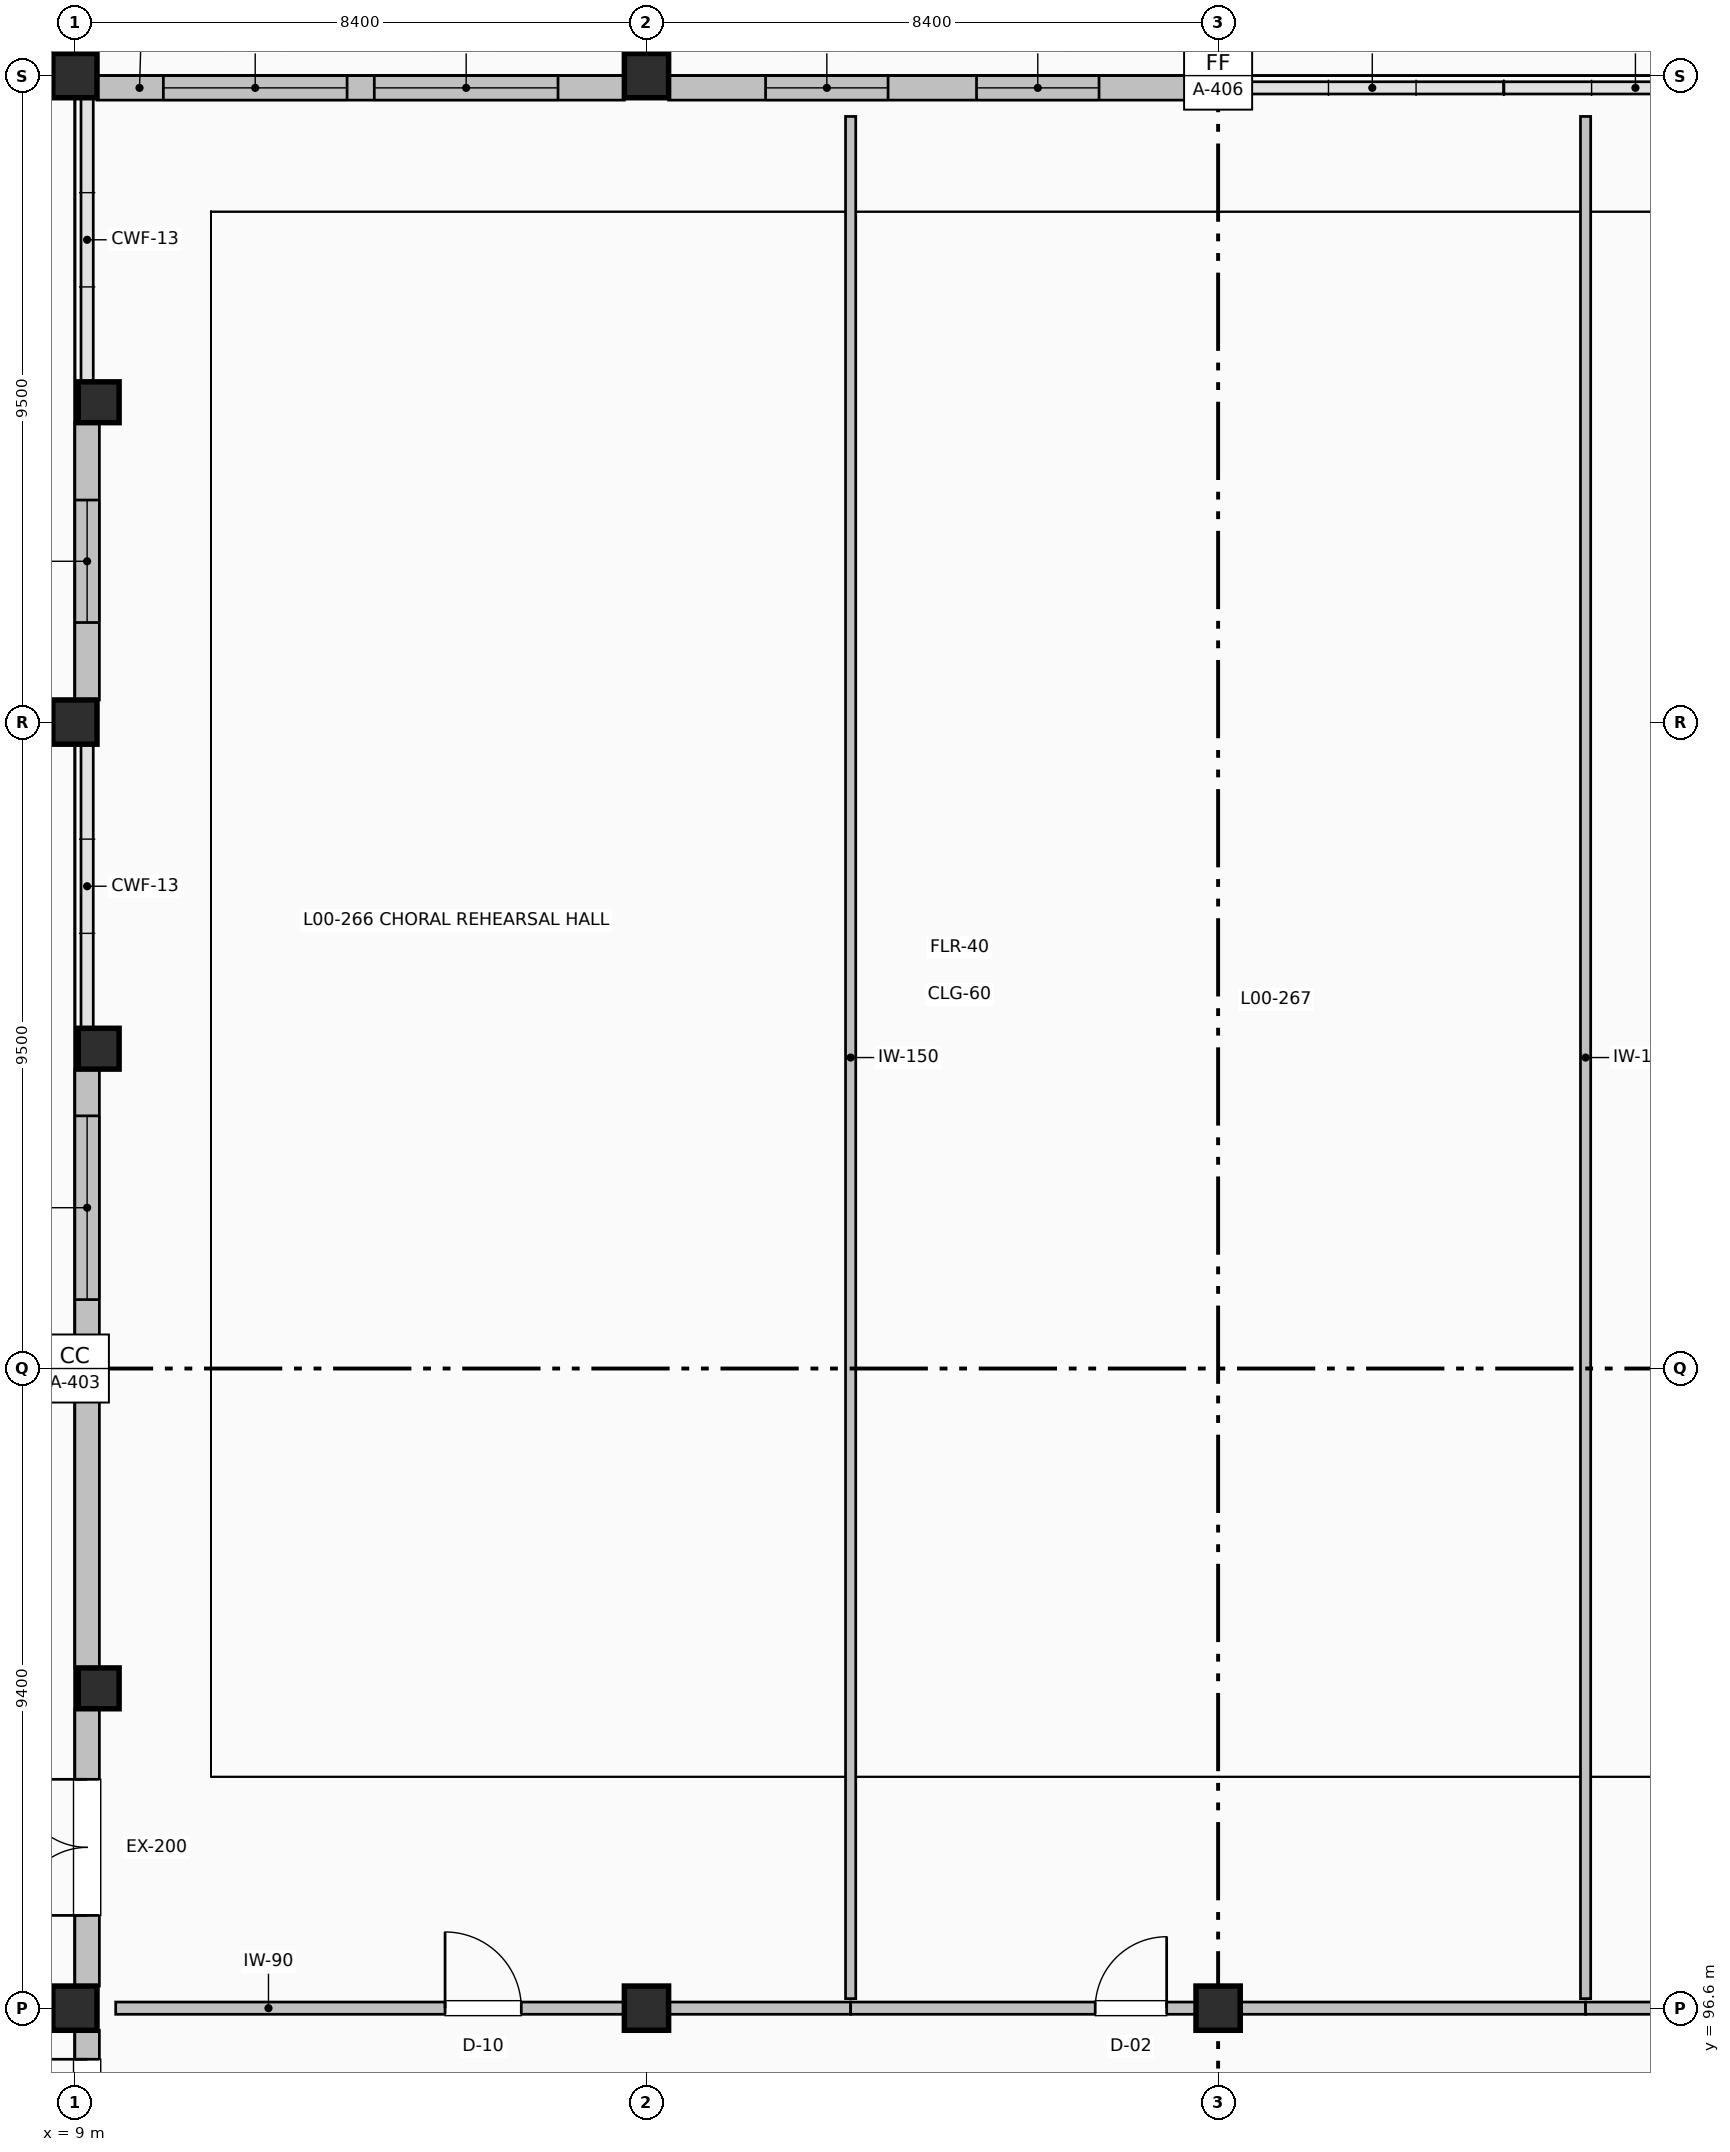
"""IFC4 building model, lengths in metres.
Left out: names, types, materials, properties, quantities, classifications, styles, units other than length and angle.
Written with IfcOpenShell. Run it as: python <this file> out.ifc"""

import sys

from ifc_helpers import new_model, si_unit, direction, frame, frame_2d, origin, origin_2d, place, context, subcontext, project, spatial, rectangle, extrude, element, fill, save


model = new_model("IFC4")
c1 = context("Model", 3, precision=1e-05, world=origin(), true_north=direction((0.0, 1.0)))
c2 = subcontext(c1, "Body", "Model", "MODEL_VIEW")
j1 = project(units=[si_unit("LENGTHUNIT", "METRE"), si_unit("PLANEANGLEUNIT", "RADIAN")], contexts=[c1])
p1 = place(None, origin())
s1 = spatial("IfcSite", under=j1, at=p1, CompositionType="ELEMENT")
p2 = place(p1, origin())
s2 = spatial("IfcBuilding", under=s1, at=p2, CompositionType="ELEMENT")
p3 = place(p2, origin())
s3 = spatial("IfcBuildingStorey", under=s2, at=p3, CompositionType="ELEMENT", Elevation=0.0)
for number, where, z_axis, x_axis in (
    (1, (9.0, 96.6, 0.0), (0.0, 0.0, 1.0), (1.0, 0.0, 0.0)),
    (2, (9.0, 106.0, 0.0), (0.0, 0.0, 1.0), (1.0, 0.0, 0.0)),
    (3, (9.0, 115.5, 0.0), (0.0, 0.0, 1.0), (1.0, 0.0, 0.0)),
    (4, (9.0, 125.0, 0.0), (0.0, 0.0, 1.0), (1.0, 0.0, 0.0)),
    (5, (17.4, 96.6, 0.0), (0.0, 0.0, 1.0), (1.0, 0.0, 0.0)),
    (6, (17.4, 125.0, 0.0), (0.0, 0.0, 1.0), (1.0, 0.0, 0.0)),
    (7, (25.8, 96.6, 0.0), (0.0, 0.0, 1.0), (1.0, 0.0, 0.0)),
    (8, (25.8, 125.0, 0.0), (0.0, 0.0, 1.0), (1.0, 0.0, 0.0)),
):
    element("IfcColumn", number, at=place(p3, frame(where, z_axis=z_axis, x_axis=x_axis)), inside=s3, PredefinedType="COLUMN", context=c2, shape_type="SweptSolid", body=[
        extrude(rectangle(XDim=0.65, YDim=0.65, at=origin_2d()), origin(), (0.0, 0.0, 1.0), 5.4),
    ])
for number, where, z_axis, x_axis in (
    (9, (9.35, 101.3, 0.0), (0.0, 0.0, 1.0), (1.0, 0.0, 0.0)),
    (10, (9.35, 110.7, 0.0), (0.0, 0.0, 1.0), (1.0, 0.0, 0.0)),
    (11, (9.35, 120.2, 0.0), (0.0, 0.0, 1.0), (1.0, 0.0, 0.0)),
):
    element("IfcColumn", number, at=place(p3, frame(where, z_axis=z_axis, x_axis=x_axis)), inside=s3, PredefinedType="PILASTER", context=c2, shape_type="SweptSolid", body=[
        extrude(rectangle(XDim=0.6, YDim=0.6, at=origin_2d()), origin(), (0.0, 0.0, 1.0), 5.4),
    ])
p4 = place(p3, frame((9.325, 124.82, 0.0), z_axis=(0.0, 0.0, 1.0), x_axis=(1.0, 0.0, 0.0)))
e12 = element("IfcWall", 12, at=p4, inside=s3, PredefinedType="SOLIDWALL", context=c2, shape_type="SweptSolid", body=[
    extrude(rectangle(XDim=7.75, YDim=0.36, at=frame_2d((3.875, 0.0))), origin(), (0.0, 0.0, 1.0), 4.192),
])
p5 = place(p4, frame((0.975, 0.0, 0.9)))
e13 = element("IfcOpeningElement", 13, at=p5, cuts=e12, PredefinedType="OPENING", context=c2, shape_type="SweptSolid", body=[
    extrude(rectangle(XDim=2.7, YDim=2.1, at=frame_2d((1.35, 1.05))), frame((0.0, 0.19, 0.0), z_axis=(0.0, -1.0, 0.0), x_axis=(1.0, 0.0, 0.0)), (0.0, 0.0, 1.0), 0.38),
])
p6 = place(p4, frame((4.075, 0.0, 0.9)))
e14 = element("IfcOpeningElement", 14, at=p6, cuts=e12, PredefinedType="OPENING", context=c2, shape_type="SweptSolid", body=[
    extrude(rectangle(XDim=2.7, YDim=2.1, at=frame_2d((1.35, 1.05))), frame((0.0, 0.19, 0.0), z_axis=(0.0, -1.0, 0.0), x_axis=(1.0, 0.0, 0.0)), (0.0, 0.0, 1.0), 0.38),
])
p7 = place(p3, frame((17.725, 124.82, 0.0), z_axis=(0.0, 0.0, 1.0), x_axis=(1.0, 0.0, 0.0)))
e15 = element("IfcWall", 15, at=p7, inside=s3, PredefinedType="SOLIDWALL", context=c2, shape_type="SweptSolid", body=[
    extrude(rectangle(XDim=7.75, YDim=0.36, at=frame_2d((3.875, 0.0))), origin(), (0.0, 0.0, 1.0), 4.192),
])
p8 = place(p7, frame((1.425, 0.0, 0.9)))
e16 = element("IfcOpeningElement", 16, at=p8, cuts=e15, PredefinedType="OPENING", context=c2, shape_type="SweptSolid", body=[
    extrude(rectangle(XDim=1.8, YDim=2.1, at=frame_2d((0.9, 1.05))), frame((0.0, 0.19, 0.0), z_axis=(0.0, -1.0, 0.0), x_axis=(1.0, 0.0, 0.0)), (0.0, 0.0, 1.0), 0.38),
])
p9 = place(p7, frame((4.525, 0.0, 0.9)))
e17 = element("IfcOpeningElement", 17, at=p9, cuts=e15, PredefinedType="OPENING", context=c2, shape_type="SweptSolid", body=[
    extrude(rectangle(XDim=1.8, YDim=2.1, at=frame_2d((0.9, 1.05))), frame((0.0, 0.19, 0.0), z_axis=(0.0, -1.0, 0.0), x_axis=(1.0, 0.0, 0.0)), (0.0, 0.0, 1.0), 0.38),
])
p10 = place(p3, frame((9.18, 92.2, 0.0), z_axis=(0.0, 0.0, 1.0), x_axis=(0.0, 1.0, 0.0)))
e18 = element("IfcWall", 18, at=p10, inside=s3, PredefinedType="SOLIDWALL", context=c2, shape_type="SweptSolid", body=[
    extrude(rectangle(XDim=4.075, YDim=0.36, at=frame_2d((2.038, 0.0))), origin(), (0.0, 0.0, 1.0), 4.192),
])
p11 = place(p10, frame((1.649, 0.0, 0.0)))
e19 = element("IfcOpeningElement", 19, at=p11, cuts=e18, PredefinedType="OPENING", context=c2, shape_type="SweptSolid", body=[
    extrude(rectangle(XDim=2.0, YDim=2.4, at=frame_2d((1.0, 1.2))), frame((0.0, 0.19, 0.0), z_axis=(0.0, -1.0, 0.0), x_axis=(1.0, 0.0, 0.0)), (0.0, 0.0, 1.0), 0.38),
])
p12 = place(p3, frame((9.18, 96.925, 0.0), z_axis=(0.0, 0.0, 1.0), x_axis=(0.0, 1.0, 0.0)))
e20 = element("IfcWall", 20, at=p12, inside=s3, PredefinedType="SOLIDWALL", context=c2, shape_type="SweptSolid", body=[
    extrude(rectangle(XDim=4.075, YDim=0.36, at=frame_2d((2.038, 0.0))), origin(), (0.0, 0.0, 1.0), 4.192),
])
p13 = place(p12, frame((1.038, 0.0, 0.0)))
e21 = element("IfcOpeningElement", 21, at=p13, cuts=e20, PredefinedType="OPENING", context=c2, shape_type="SweptSolid", body=[
    extrude(rectangle(XDim=2.0, YDim=2.4, at=frame_2d((1.0, 1.2))), frame((0.0, 0.19, 0.0), z_axis=(0.0, -1.0, 0.0), x_axis=(1.0, 0.0, 0.0)), (0.0, 0.0, 1.0), 0.38),
])
p14 = place(p3, frame((9.18, 101.6, 0.0), z_axis=(0.0, 0.0, 1.0), x_axis=(0.0, 1.0, 0.0)))
e22 = element("IfcWall", 22, at=p14, inside=s3, PredefinedType="SOLIDWALL", context=c2, shape_type="SweptSolid", body=[
    extrude(rectangle(XDim=4.075, YDim=0.36, at=frame_2d((2.038, 0.0))), origin(), (0.0, 0.0, 1.0), 4.192),
])
p15 = place(p3, frame((9.18, 106.325, 0.0), z_axis=(0.0, 0.0, 1.0), x_axis=(0.0, 1.0, 0.0)))
e23 = element("IfcWall", 23, at=p15, inside=s3, PredefinedType="SOLIDWALL", context=c2, shape_type="SweptSolid", body=[
    extrude(rectangle(XDim=4.075, YDim=0.36, at=frame_2d((2.038, 0.0))), origin(), (0.0, 0.0, 1.0), 4.192),
])
p16 = place(p15, frame((0.688, 0.0, 0.9)))
e24 = element("IfcOpeningElement", 24, at=p16, cuts=e23, PredefinedType="OPENING", context=c2, shape_type="SweptSolid", body=[
    extrude(rectangle(XDim=2.7, YDim=2.1, at=frame_2d((1.35, 1.05))), frame((0.0, 0.19, 0.0), z_axis=(0.0, -1.0, 0.0), x_axis=(1.0, 0.0, 0.0)), (0.0, 0.0, 1.0), 0.38),
])
p17 = place(p3, frame((9.18, 115.825, 0.0), z_axis=(0.0, 0.0, 1.0), x_axis=(0.0, 1.0, 0.0)))
e25 = element("IfcWall", 25, at=p17, inside=s3, PredefinedType="SOLIDWALL", context=c2, shape_type="SweptSolid", body=[
    extrude(rectangle(XDim=4.075, YDim=0.36, at=frame_2d((2.038, 0.0))), origin(), (0.0, 0.0, 1.0), 4.192),
])
p18 = place(p17, frame((1.138, 0.0, 0.9)))
e26 = element("IfcOpeningElement", 26, at=p18, cuts=e25, PredefinedType="OPENING", context=c2, shape_type="SweptSolid", body=[
    extrude(rectangle(XDim=1.8, YDim=2.1, at=frame_2d((0.9, 1.05))), frame((0.0, 0.19, 0.0), z_axis=(0.0, -1.0, 0.0), x_axis=(1.0, 0.0, 0.0)), (0.0, 0.0, 1.0), 0.38),
])
p19 = place(p3, frame((9.6, 96.6, 0.0), z_axis=(0.0, 0.0, 1.0), x_axis=(1.0, 0.0, 0.0)))
e27 = element("IfcWall", 27, at=p19, inside=s3, PredefinedType="PARTITIONING", context=c2, shape_type="SweptSolid", body=[
    extrude(rectangle(XDim=7.475, YDim=0.18, at=frame_2d((3.737, 0.0))), origin(), (0.0, 0.0, 1.0), 4.242),
])
p20 = place(p19, frame((4.84, 0.0, 0.0)))
e28 = element("IfcOpeningElement", 28, at=p20, cuts=e27, PredefinedType="OPENING", context=c2, shape_type="SweptSolid", body=[
    extrude(rectangle(XDim=1.12, YDim=2.12, at=frame_2d((0.56, 1.06))), frame((0.0, 0.1, 0.0), z_axis=(0.0, -1.0, 0.0), x_axis=(1.0, 0.0, 0.0)), (0.0, 0.0, 1.0), 0.2),
])
p21 = place(p3, frame((17.725, 96.6, 0.0), z_axis=(0.0, 0.0, 1.0), x_axis=(1.0, 0.0, 0.0)))
e29 = element("IfcWall", 29, at=p21, inside=s3, PredefinedType="PARTITIONING", context=c2, shape_type="SweptSolid", body=[
    extrude(rectangle(XDim=2.675, YDim=0.18, at=frame_2d((1.337, 0.0))), origin(), (0.0, 0.0, 1.0), 4.242),
])
p22 = place(p3, frame((20.4, 96.74, 0.0), z_axis=(0.0, 0.0, 1.0), x_axis=(0.0, 1.0, 0.0)))
e30 = element("IfcWall", 30, at=p22, inside=s3, PredefinedType="PARTITIONING", context=c2, shape_type="SweptSolid", body=[
    extrude(rectangle(XDim=27.66, YDim=0.15, at=frame_2d((13.83, 0.0))), origin(), (0.0, 0.0, 1.0), 5.092),
])
p23 = place(p3, frame((20.4, 96.6, 0.0), z_axis=(0.0, 0.0, 1.0), x_axis=(1.0, 0.0, 0.0)))
e31 = element("IfcWall", 31, at=p23, inside=s3, PredefinedType="PARTITIONING", context=c2, shape_type="SweptSolid", body=[
    extrude(rectangle(XDim=5.075, YDim=0.18, at=frame_2d((2.538, 0.0))), origin(), (0.0, 0.0, 1.0), 4.242),
])
p24 = place(p23, frame((3.594, 0.0, 0.0)))
e32 = element("IfcOpeningElement", 32, at=p24, cuts=e31, PredefinedType="OPENING", context=c2, shape_type="SweptSolid", body=[
    extrude(rectangle(XDim=1.05, YDim=2.1, at=frame_2d((0.525, 1.05))), frame((0.0, 0.1, 0.0), z_axis=(0.0, -1.0, 0.0), x_axis=(1.0, 0.0, 0.0)), (0.0, 0.0, 1.0), 0.2),
])
p25 = place(p3, frame((26.125, 96.6, 0.0), z_axis=(0.0, 0.0, 1.0), x_axis=(1.0, 0.0, 0.0)))
e33 = element("IfcWall", 33, at=p25, inside=s3, PredefinedType="PARTITIONING", context=c2, shape_type="SweptSolid", body=[
    extrude(rectangle(XDim=5.075, YDim=0.18, at=frame_2d((2.538, 0.0))), origin(), (0.0, 0.0, 1.0), 4.242),
])
p26 = place(p3, frame((31.2, 96.74, 0.0), z_axis=(0.0, 0.0, 1.0), x_axis=(0.0, 1.0, 0.0)))
e34 = element("IfcWall", 34, at=p26, inside=s3, PredefinedType="PARTITIONING", context=c2, shape_type="SweptSolid", body=[
    extrude(rectangle(XDim=27.66, YDim=0.15, at=frame_2d((13.83, 0.0))), origin(), (0.0, 0.0, 1.0), 5.092),
])
p27 = place(p3, frame((31.2, 96.6, 0.0), z_axis=(0.0, 0.0, 1.0), x_axis=(1.0, 0.0, 0.0)))
e35 = element("IfcWall", 35, at=p27, inside=s3, PredefinedType="PARTITIONING", context=c2, shape_type="SweptSolid", body=[
    extrude(rectangle(XDim=2.675, YDim=0.18, at=frame_2d((1.337, 0.0))), origin(), (0.0, 0.0, 1.0), 4.242),
])
p28 = place(p11, origin())
e36 = element("IfcDoor", 36, at=p28, inside=s3, OperationType="DOUBLE_DOOR_SINGLE_SWING", PredefinedType="DOOR", context=c2, shape_type="SweptSolid", body=[
    extrude(rectangle(XDim=2.0, YDim=2.4, at=frame_2d((1.0, 1.2))), frame((0.0, 0.025, 0.0), z_axis=(0.0, -1.0, 0.0), x_axis=(1.0, 0.0, 0.0)), (0.0, 0.0, 1.0), 0.05),
])
fill(e19, e36)
p29 = place(p13, origin())
e37 = element("IfcDoor", 37, at=p29, inside=s3, OperationType="DOUBLE_DOOR_SINGLE_SWING", PredefinedType="DOOR", context=c2, shape_type="SweptSolid", body=[
    extrude(rectangle(XDim=2.0, YDim=2.4, at=frame_2d((1.0, 1.2))), frame((0.0, 0.025, 0.0), z_axis=(0.0, -1.0, 0.0), x_axis=(1.0, 0.0, 0.0)), (0.0, 0.0, 1.0), 0.05),
])
fill(e21, e37)
p30 = place(p5, origin())
e38 = element("IfcWindow", 38, at=p30, inside=s3, PartitioningType="SINGLE_PANEL", PredefinedType="WINDOW", context=c2, shape_type="SweptSolid", body=[
    extrude(rectangle(XDim=2.7, YDim=2.1, at=frame_2d((1.35, 1.05))), frame((0.0, 0.03, 0.0), z_axis=(0.0, -1.0, 0.0), x_axis=(1.0, 0.0, 0.0)), (0.0, 0.0, 1.0), 0.06),
])
fill(e13, e38)
p31 = place(p6, origin())
e39 = element("IfcWindow", 39, at=p31, inside=s3, PartitioningType="SINGLE_PANEL", PredefinedType="WINDOW", context=c2, shape_type="SweptSolid", body=[
    extrude(rectangle(XDim=2.7, YDim=2.1, at=frame_2d((1.35, 1.05))), frame((0.0, 0.03, 0.0), z_axis=(0.0, -1.0, 0.0), x_axis=(1.0, 0.0, 0.0)), (0.0, 0.0, 1.0), 0.06),
])
fill(e14, e39)
p32 = place(p8, origin())
e40 = element("IfcWindow", 40, at=p32, inside=s3, PartitioningType="SINGLE_PANEL", PredefinedType="WINDOW", context=c2, shape_type="SweptSolid", body=[
    extrude(rectangle(XDim=1.8, YDim=2.1, at=frame_2d((0.9, 1.05))), frame((0.0, 0.03, 0.0), z_axis=(0.0, -1.0, 0.0), x_axis=(1.0, 0.0, 0.0)), (0.0, 0.0, 1.0), 0.06),
])
fill(e16, e40)
p33 = place(p9, origin())
e41 = element("IfcWindow", 41, at=p33, inside=s3, PartitioningType="SINGLE_PANEL", PredefinedType="WINDOW", context=c2, shape_type="SweptSolid", body=[
    extrude(rectangle(XDim=1.8, YDim=2.1, at=frame_2d((0.9, 1.05))), frame((0.0, 0.03, 0.0), z_axis=(0.0, -1.0, 0.0), x_axis=(1.0, 0.0, 0.0)), (0.0, 0.0, 1.0), 0.06),
])
fill(e17, e41)
p34 = place(p16, origin())
e42 = element("IfcWindow", 42, at=p34, inside=s3, PartitioningType="SINGLE_PANEL", PredefinedType="WINDOW", context=c2, shape_type="SweptSolid", body=[
    extrude(rectangle(XDim=2.7, YDim=2.1, at=frame_2d((1.35, 1.05))), frame((0.0, 0.03, 0.0), z_axis=(0.0, -1.0, 0.0), x_axis=(1.0, 0.0, 0.0)), (0.0, 0.0, 1.0), 0.06),
])
fill(e24, e42)
p35 = place(p18, origin())
e43 = element("IfcWindow", 43, at=p35, inside=s3, PartitioningType="SINGLE_PANEL", PredefinedType="WINDOW", context=c2, shape_type="SweptSolid", body=[
    extrude(rectangle(XDim=1.8, YDim=2.1, at=frame_2d((0.9, 1.05))), frame((0.0, 0.03, 0.0), z_axis=(0.0, -1.0, 0.0), x_axis=(1.0, 0.0, 0.0)), (0.0, 0.0, 1.0), 0.06),
])
fill(e26, e43)
p36 = place(p20, origin())
e44 = element("IfcDoor", 44, at=p36, inside=s3, OperationType="SINGLE_SWING_LEFT", PredefinedType="DOOR", context=c2, shape_type="SweptSolid", body=[
    extrude(rectangle(XDim=1.12, YDim=2.12, at=frame_2d((0.56, 1.06))), frame((0.0, 0.025, 0.0), z_axis=(0.0, -1.0, 0.0), x_axis=(1.0, 0.0, 0.0)), (0.0, 0.0, 1.0), 0.05),
])
fill(e28, e44)
p37 = place(p24, origin())
e45 = element("IfcDoor", 45, at=p37, inside=s3, OperationType="SINGLE_SWING_RIGHT", PredefinedType="DOOR", context=c2, shape_type="SweptSolid", body=[
    extrude(rectangle(XDim=1.05, YDim=2.1, at=frame_2d((0.525, 1.05))), frame((0.0, 0.025, 0.0), z_axis=(0.0, -1.0, 0.0), x_axis=(1.0, 0.0, 0.0)), (0.0, 0.0, 1.0), 0.05),
])
fill(e32, e45)
save(model, sys.argv[1])
